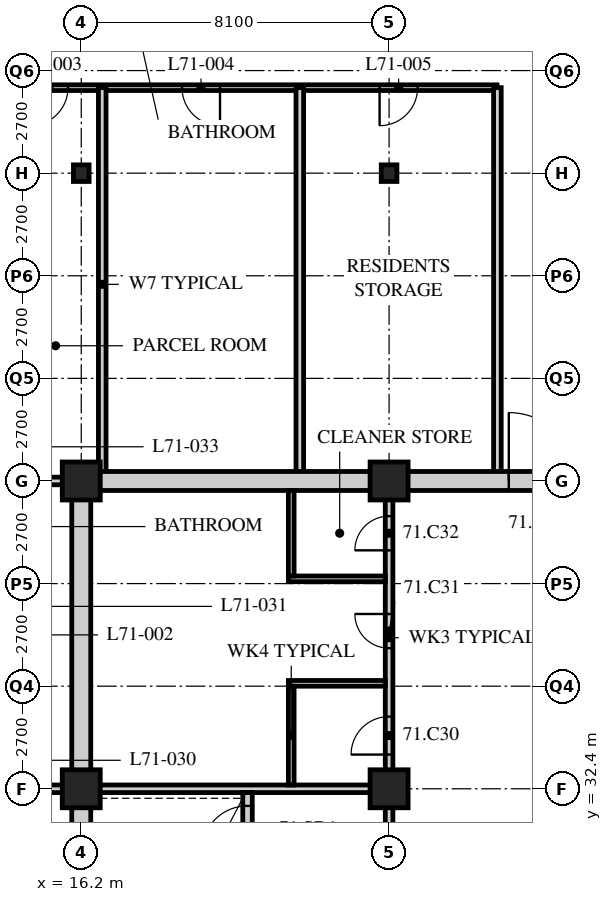
"""IFC4 building model, lengths in metres.
Left out: names, types, materials, properties, quantities, classifications, styles, units other than length and angle.
Written with IfcOpenShell. Run it as: python <this file> out.ifc"""

import sys

from ifc_helpers import new_model, si_unit, direction, frame, frame_2d, origin, origin_2d, place, context, subcontext, project, spatial, rectangle, hollow_rectangle, i_section, extrude, element, fill, save


model = new_model("IFC4")
c1 = context("Model", 3, precision=1e-05, world=origin(), true_north=direction((0.0, 1.0)))
c2 = subcontext(c1, "Body", "Model", "MODEL_VIEW")
j1 = project(units=[si_unit("LENGTHUNIT", "METRE"), si_unit("PLANEANGLEUNIT", "RADIAN")], contexts=[c1])
p1 = place(None, origin())
s1 = spatial("IfcSite", under=j1, at=p1, CompositionType="ELEMENT")
p2 = place(p1, origin())
s2 = spatial("IfcBuilding", under=s1, at=p2, CompositionType="ELEMENT")
p3 = place(p2, frame((0.0, 0.0, 277.5)))
s3 = spatial("IfcBuildingStorey", under=s2, at=p3, CompositionType="ELEMENT", Elevation=277.5)
for number, where, z_axis, x_axis in (
    (1, (16.2, 32.4, 0.0), (0.0, 0.0, 1.0), (1.0, 0.0, 0.0)),
    (2, (16.2, 40.5, 0.0), (0.0, 0.0, 1.0), (1.0, 0.0, 0.0)),
):
    element("IfcColumn", number, at=place(p3, frame(where, z_axis=z_axis, x_axis=x_axis)), inside=s3, PredefinedType="COLUMN", context=c2, shape_type="SweptSolid", body=[
        extrude(hollow_rectangle(XDim=1.0, YDim=1.0, WallThickness=0.1, at=origin_2d()), origin(), (0.0, 0.0, 1.0), 3.9),
    ])
p4 = place(p3, frame((16.2, 48.6, 0.0), z_axis=(0.0, 0.0, 1.0), x_axis=(1.0, 0.0, 0.0)))
e3 = element("IfcColumn", 3, at=p4, inside=s3, PredefinedType="COLUMN", context=c2, shape_type="SweptSolid", body=[
    extrude(i_section(OverallWidth=0.412, OverallDepth=0.437, WebThickness=0.036, FlangeThickness=0.058, FilletRadius=0.015, at=origin_2d()), origin(), (0.0, 0.0, 1.0), 3.9),
])
for number, where, z_axis, x_axis in (
    (4, (24.3, 32.4, 0.0), (0.0, 0.0, 1.0), (1.0, 0.0, 0.0)),
    (5, (24.3, 40.5, 0.0), (0.0, 0.0, 1.0), (1.0, 0.0, 0.0)),
):
    element("IfcColumn", number, at=place(p3, frame(where, z_axis=z_axis, x_axis=x_axis)), inside=s3, PredefinedType="COLUMN", context=c2, shape_type="SweptSolid", body=[
        extrude(hollow_rectangle(XDim=1.0, YDim=1.0, WallThickness=0.1, at=origin_2d()), origin(), (0.0, 0.0, 1.0), 3.9),
    ])
p5 = place(p3, frame((24.3, 48.6, 0.0), z_axis=(0.0, 0.0, 1.0), x_axis=(1.0, 0.0, 0.0)))
e6 = element("IfcColumn", 6, at=p5, inside=s3, PredefinedType="COLUMN", context=c2, shape_type="SweptSolid", body=[
    extrude(i_section(OverallWidth=0.412, OverallDepth=0.437, WebThickness=0.036, FlangeThickness=0.058, FilletRadius=0.015, at=origin_2d()), origin(), (0.0, 0.0, 1.0), 3.9),
])
p6 = place(p3, frame((13.95, 50.85, 0.0), z_axis=(0.0, 0.0, 1.0), x_axis=(1.0, 0.0, 0.0)))
e7 = element("IfcWall", 7, at=p6, inside=s3, PredefinedType="PARTITIONING", context=c2, shape_type="SweptSolid", body=[
    extrude(rectangle(XDim=13.19, YDim=0.15, at=frame_2d((6.595, 0.0))), origin(), (0.0, 0.0, 1.0), 3.69),
])
p7 = place(p6, frame((0.901, 0.0, 0.0)))
e8 = element("IfcOpeningElement", 8, at=p7, cuts=e7, PredefinedType="OPENING", context=c2, shape_type="SweptSolid", body=[
    extrude(rectangle(XDim=1.0, YDim=2.1, at=frame_2d((0.5, 1.05))), frame((0.0, 0.085, 0.0), z_axis=(0.0, -1.0, 0.0), x_axis=(1.0, 0.0, 0.0)), (0.0, 0.0, 1.0), 0.17),
])
p8 = place(p6, frame((4.901, 0.0, 0.0)))
e9 = element("IfcOpeningElement", 9, at=p8, cuts=e7, PredefinedType="OPENING", context=c2, shape_type="SweptSolid", body=[
    extrude(rectangle(XDim=1.0, YDim=2.1, at=frame_2d((0.5, 1.05))), frame((0.0, 0.085, 0.0), z_axis=(0.0, -1.0, 0.0), x_axis=(1.0, 0.0, 0.0)), (0.0, 0.0, 1.0), 0.17),
])
p9 = place(p6, frame((10.101, 0.0, 0.0)))
e10 = element("IfcOpeningElement", 10, at=p9, cuts=e7, PredefinedType="OPENING", context=c2, shape_type="SweptSolid", body=[
    extrude(rectangle(XDim=1.0, YDim=2.1, at=frame_2d((0.5, 1.05))), frame((0.0, 0.085, 0.0), z_axis=(0.0, -1.0, 0.0), x_axis=(1.0, 0.0, 0.0)), (0.0, 0.0, 1.0), 0.17),
])
p10 = place(p3, frame((13.95, 32.4, 0.0), z_axis=(0.0, 0.0, 1.0), x_axis=(1.0, 0.0, 0.0)))
e11 = element("IfcWall", 11, at=p10, inside=s3, PredefinedType="SOLIDWALL", context=c2, shape_type="SweptSolid", body=[
    extrude(rectangle(XDim=2.25, YDim=0.2, at=frame_2d((1.125, 0.0))), origin(), (0.0, 0.0, 1.0), 3.078),
])
for number, where, z_axis, x_axis in (
    (12, (16.752, 50.85, 0.0), (0.0, 0.0, 1.0), (0.0, -1.0, 0.0)),
    (13, (21.951, 50.85, 0.0), (0.0, 0.0, 1.0), (0.0, -1.0, 0.0)),
    (14, (27.15, 40.5, 0.0), (0.0, 0.0, 1.0), (0.0, 1.0, 0.0)),
):
    element("IfcWall", number, at=place(p3, frame(where, z_axis=z_axis, x_axis=x_axis)), inside=s3, PredefinedType="SOLIDWALL", context=c2, shape_type="SweptSolid", body=[
        extrude(rectangle(XDim=10.35, YDim=0.2, at=frame_2d((5.175, 0.0))), origin(), (0.0, 0.0, 1.0), 3.69),
    ])
p11 = place(p3, frame((13.95, 40.5, 0.0), z_axis=(0.0, 0.0, 1.0), x_axis=(1.0, 0.0, 0.0)))
e15 = element("IfcWall", 15, at=p11, inside=s3, PredefinedType="SOLIDWALL", context=c2, shape_type="SweptSolid", body=[
    extrude(rectangle(XDim=2.25, YDim=0.2, at=frame_2d((1.125, 0.0))), origin(), (0.0, 0.0, 1.0), 3.078),
])
p12 = place(p3, frame((15.95, 40.5, 0.0), z_axis=(0.0, 0.0, 1.0), x_axis=(1.0, 0.0, 0.0)))
e16 = element("IfcWall", 16, at=p12, inside=s3, PredefinedType="SOLIDWALL", context=c2, shape_type="SweptSolid", body=[
    extrude(rectangle(XDim=24.55, YDim=0.5, at=frame_2d((12.275, 0.0))), origin(), (0.0, 0.0, 1.0), 3.04),
])
p13 = place(p12, frame((11.5, 0.0, 0.0)))
e17 = element("IfcOpeningElement", 17, at=p13, cuts=e16, PredefinedType="OPENING", context=c2, shape_type="SweptSolid", body=[
    extrude(rectangle(XDim=1.8, YDim=2.4, at=frame_2d((0.9, 1.2))), frame((0.0, 0.26, 0.0), z_axis=(0.0, -1.0, 0.0), x_axis=(1.0, 0.0, 0.0)), (0.0, 0.0, 1.0), 0.52),
])
p14 = place(p3, frame((16.2, 24.55, 0.0), z_axis=(0.0, 0.0, 1.0), x_axis=(0.0, 1.0, 0.0)))
e18 = element("IfcWall", 18, at=p14, inside=s3, PredefinedType="SOLIDWALL", context=c2, shape_type="SweptSolid", body=[
    extrude(rectangle(XDim=15.7, YDim=0.5, at=frame_2d((7.85, 0.0))), origin(), (0.0, 0.0, 1.0), 3.078),
])
p15 = place(p3, frame((16.45, 32.4, 0.0), z_axis=(0.0, 0.0, 1.0), x_axis=(1.0, 0.0, 0.0)))
e19 = element("IfcWall", 19, at=p15, inside=s3, PredefinedType="SOLIDWALL", context=c2, shape_type="SweptSolid", body=[
    extrude(rectangle(XDim=7.95, YDim=0.2, at=frame_2d((3.975, 0.0))), origin(), (0.0, 0.0, 1.0), 3.078),
])
p16 = place(p3, frame((24.3, 24.55, 0.0), z_axis=(0.0, 0.0, 1.0), x_axis=(0.0, 1.0, 0.0)))
e20 = element("IfcWall", 20, at=p16, inside=s3, PredefinedType="SOLIDWALL", context=c2, shape_type="SweptSolid", body=[
    extrude(rectangle(XDim=7.75, YDim=0.2, at=frame_2d((3.875, 0.0))), origin(), (0.0, 0.0, 1.0), 3.078),
])
p17 = place(p16, frame((4.6, 0.0, 0.0)))
e21 = element("IfcOpeningElement", 21, at=p17, cuts=e20, PredefinedType="OPENING", context=c2, shape_type="SweptSolid", body=[
    extrude(rectangle(XDim=1.2, YDim=2.1, at=frame_2d((0.6, 1.05))), frame((0.0, 0.11, 0.0), z_axis=(0.0, -1.0, 0.0), x_axis=(1.0, 0.0, 0.0)), (0.0, 0.0, 1.0), 0.22),
])
p18 = place(p3, frame((20.575, 24.55, 0.0), z_axis=(0.0, 0.0, 1.0), x_axis=(0.0, 1.0, 0.0)))
e22 = element("IfcWall", 22, at=p18, inside=s3, PredefinedType="SOLIDWALL", context=c2, shape_type="SweptSolid", body=[
    extrude(rectangle(XDim=7.75, YDim=0.25, at=frame_2d((3.875, 0.0))), origin(), (0.0, 0.0, 1.0), 3.69),
])
p19 = place(p18, frame((6.2, 0.0, 0.0)))
e23 = element("IfcOpeningElement", 23, at=p19, cuts=e22, PredefinedType="OPENING", context=c2, shape_type="SweptSolid", body=[
    extrude(rectangle(XDim=1.2, YDim=2.1, at=frame_2d((0.6, 1.05))), frame((0.0, 0.135, 0.0), z_axis=(0.0, -1.0, 0.0), x_axis=(1.0, 0.0, 0.0)), (0.0, 0.0, 1.0), 0.27),
])
p20 = place(p3, frame((24.3, 32.5, 0.0), z_axis=(0.0, 0.0, 1.0), x_axis=(0.0, 1.0, 0.0)))
e24 = element("IfcWall", 24, at=p20, inside=s3, PredefinedType="PARTITIONING", context=c2, shape_type="SweptSolid", body=[
    extrude(rectangle(XDim=7.75, YDim=0.2, at=frame_2d((3.875, 0.0))), origin(), (0.0, 0.0, 1.0), 3.078),
])
p21 = place(p20, frame((0.8, 0.0, 0.0)))
e25 = element("IfcOpeningElement", 25, at=p21, cuts=e24, PredefinedType="OPENING", context=c2, shape_type="SweptSolid", body=[
    extrude(rectangle(XDim=1.0, YDim=2.1, at=frame_2d((0.5, 1.05))), frame((0.0, 0.11, 0.0), z_axis=(0.0, -1.0, 0.0), x_axis=(1.0, 0.0, 0.0)), (0.0, 0.0, 1.0), 0.22),
])
p22 = place(p20, frame((3.6, 0.0, 0.0)))
e26 = element("IfcOpeningElement", 26, at=p22, cuts=e24, PredefinedType="OPENING", context=c2, shape_type="SweptSolid", body=[
    extrude(rectangle(XDim=0.9, YDim=2.1, at=frame_2d((0.45, 1.05))), frame((0.0, 0.11, 0.0), z_axis=(0.0, -1.0, 0.0), x_axis=(1.0, 0.0, 0.0)), (0.0, 0.0, 1.0), 0.22),
])
p23 = place(p20, frame((6.175, 0.0, 0.0)))
e27 = element("IfcOpeningElement", 27, at=p23, cuts=e24, PredefinedType="OPENING", context=c2, shape_type="SweptSolid", body=[
    extrude(rectangle(XDim=0.9, YDim=2.1, at=frame_2d((0.45, 1.05))), frame((0.0, 0.11, 0.0), z_axis=(0.0, -1.0, 0.0), x_axis=(1.0, 0.0, 0.0)), (0.0, 0.0, 1.0), 0.22),
])
for number, where, z_axis, x_axis in (
    (28, (21.65, 35.175, 0.0), (0.0, 0.0, 1.0), (1.0, 0.0, 0.0)),
    (29, (21.65, 37.925, 0.0), (0.0, 0.0, 1.0), (1.0, 0.0, 0.0)),
):
    element("IfcWall", number, at=place(p3, frame(where, z_axis=z_axis, x_axis=x_axis)), inside=s3, PredefinedType="PARTITIONING", context=c2, shape_type="SweptSolid", body=[
        extrude(rectangle(XDim=2.55, YDim=0.15, at=frame_2d((1.275, 0.0))), origin(), (0.0, 0.0, 1.0), 3.69),
    ])
p24 = place(p3, frame((21.725, 32.5, 0.0), z_axis=(0.0, 0.0, 1.0), x_axis=(0.0, 1.0, 0.0)))
e30 = element("IfcWall", 30, at=p24, inside=s3, PredefinedType="PARTITIONING", context=c2, shape_type="SweptSolid", body=[
    extrude(rectangle(XDim=2.6, YDim=0.15, at=frame_2d((1.3, 0.0))), origin(), (0.0, 0.0, 1.0), 3.69),
])
p25 = place(p3, frame((21.725, 38.0, 0.0), z_axis=(0.0, 0.0, 1.0), x_axis=(0.0, 1.0, 0.0)))
e31 = element("IfcWall", 31, at=p25, inside=s3, PredefinedType="PARTITIONING", context=c2, shape_type="SweptSolid", body=[
    extrude(rectangle(XDim=2.25, YDim=0.15, at=frame_2d((1.125, 0.0))), origin(), (0.0, 0.0, 1.0), 3.69),
])
p26 = place(p7, origin())
e32 = element("IfcDoor", 32, at=p26, inside=s3, OperationType="SINGLE_SWING_RIGHT", PredefinedType="DOOR", context=c2, shape_type="SweptSolid", body=[
    extrude(rectangle(XDim=1.0, YDim=2.1, at=frame_2d((0.5, 1.05))), frame((0.0, 0.025, 0.0), z_axis=(0.0, -1.0, 0.0), x_axis=(1.0, 0.0, 0.0)), (0.0, 0.0, 1.0), 0.05),
])
fill(e8, e32)
p27 = place(p8, origin())
e33 = element("IfcDoor", 33, at=p27, inside=s3, OperationType="SINGLE_SWING_LEFT", PredefinedType="DOOR", context=c2, shape_type="SweptSolid", body=[
    extrude(rectangle(XDim=1.0, YDim=2.1, at=frame_2d((0.5, 1.05))), frame((0.0, 0.025, 0.0), z_axis=(0.0, -1.0, 0.0), x_axis=(1.0, 0.0, 0.0)), (0.0, 0.0, 1.0), 0.05),
])
fill(e9, e33)
p28 = place(p9, origin())
e34 = element("IfcDoor", 34, at=p28, inside=s3, OperationType="SINGLE_SWING_RIGHT", PredefinedType="DOOR", context=c2, shape_type="SweptSolid", body=[
    extrude(rectangle(XDim=1.0, YDim=2.1, at=frame_2d((0.5, 1.05))), frame((0.0, 0.025, 0.0), z_axis=(0.0, -1.0, 0.0), x_axis=(1.0, 0.0, 0.0)), (0.0, 0.0, 1.0), 0.05),
])
fill(e10, e34)
p29 = place(p21, origin())
e35 = element("IfcDoor", 35, at=p29, inside=s3, OperationType="SINGLE_SWING_LEFT", PredefinedType="DOOR", context=c2, shape_type="SweptSolid", body=[
    extrude(rectangle(XDim=1.0, YDim=2.1, at=frame_2d((0.5, 1.05))), frame((0.0, 0.025, 0.0), z_axis=(0.0, -1.0, 0.0), x_axis=(1.0, 0.0, 0.0)), (0.0, 0.0, 1.0), 0.05),
])
fill(e25, e35)
p30 = place(p22, origin())
e36 = element("IfcDoor", 36, at=p30, inside=s3, OperationType="SINGLE_SWING_RIGHT", PredefinedType="DOOR", context=c2, shape_type="SweptSolid", body=[
    extrude(rectangle(XDim=0.9, YDim=2.1, at=frame_2d((0.45, 1.05))), frame((0.0, 0.025, 0.0), z_axis=(0.0, -1.0, 0.0), x_axis=(1.0, 0.0, 0.0)), (0.0, 0.0, 1.0), 0.05),
])
fill(e26, e36)
p31 = place(p23, origin())
e37 = element("IfcDoor", 37, at=p31, inside=s3, OperationType="SINGLE_SWING_LEFT", PredefinedType="DOOR", context=c2, shape_type="SweptSolid", body=[
    extrude(rectangle(XDim=0.9, YDim=2.1, at=frame_2d((0.45, 1.05))), frame((0.0, 0.025, 0.0), z_axis=(0.0, -1.0, 0.0), x_axis=(1.0, 0.0, 0.0)), (0.0, 0.0, 1.0), 0.05),
])
fill(e27, e37)
p32 = place(p19, origin())
e38 = element("IfcDoor", 38, at=p32, inside=s3, OperationType="SINGLE_SWING_LEFT", PredefinedType="DOOR", context=c2, shape_type="SweptSolid", body=[
    extrude(rectangle(XDim=1.2, YDim=2.1, at=frame_2d((0.6, 1.05))), frame((0.0, 0.025, 0.0), z_axis=(0.0, -1.0, 0.0), x_axis=(1.0, 0.0, 0.0)), (0.0, 0.0, 1.0), 0.05),
])
fill(e23, e38)
p33 = place(p13, origin())
e39 = element("IfcDoor", 39, at=p33, inside=s3, OperationType="DOUBLE_DOOR_SINGLE_SWING", PredefinedType="DOOR", context=c2, shape_type="SweptSolid", body=[
    extrude(rectangle(XDim=1.8, YDim=2.4, at=frame_2d((0.9, 1.2))), frame((0.0, 0.025, 0.0), z_axis=(0.0, -1.0, 0.0), x_axis=(1.0, 0.0, 0.0)), (0.0, 0.0, 1.0), 0.05),
])
fill(e17, e39)
save(model, sys.argv[1])
